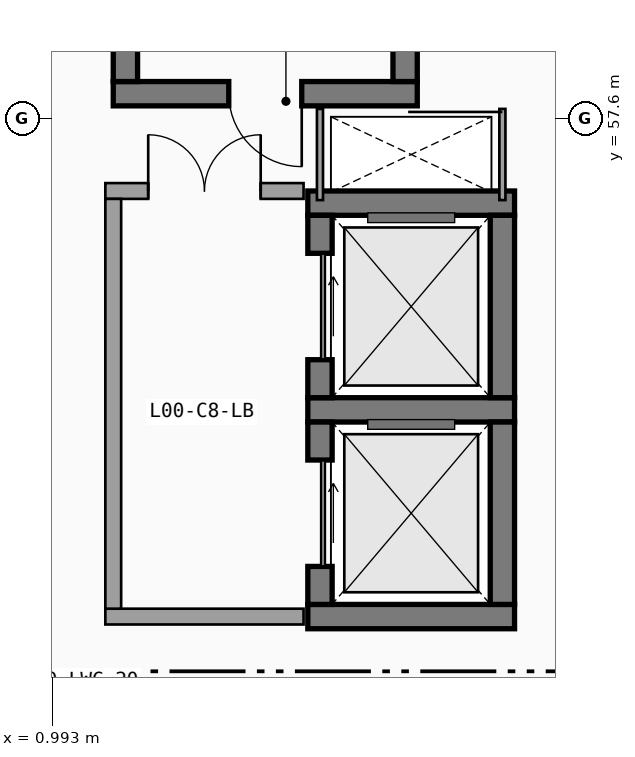
"""IFC4 building model, lengths in metres.
Left out: names, types, materials, properties, quantities, classifications, styles, units other than length and angle.
Written with IfcOpenShell. Run it as: python <this file> out.ifc"""

import sys

from ifc_helpers import new_model, si_unit, direction, frame, frame_2d, origin, place, context, subcontext, project, spatial, rectangle, extrude, element, fill, save


model = new_model("IFC4")
c1 = context("Model", 3, precision=1e-05, world=origin(), true_north=direction((0.0, 1.0)))
c2 = subcontext(c1, "Body", "Model", "MODEL_VIEW")
j1 = project(units=[si_unit("LENGTHUNIT", "METRE"), si_unit("PLANEANGLEUNIT", "RADIAN")], contexts=[c1])
p1 = place(None, origin())
s1 = spatial("IfcSite", under=j1, at=p1, CompositionType="ELEMENT")
p2 = place(p1, origin())
s2 = spatial("IfcBuilding", under=s1, at=p2, CompositionType="ELEMENT")
p3 = place(p2, origin())
s3 = spatial("IfcBuildingStorey", under=s2, at=p3, CompositionType="ELEMENT", Elevation=0.0)
p4 = place(p3, frame((2.0, 58.0, 0.0), z_axis=(0.0, 0.0, 1.0), x_axis=(1.0, 0.0, 0.0)))
e1 = element("IfcWall", 1, at=p4, inside=s3, PredefinedType="SHEAR", context=c2, shape_type="SweptSolid", body=[
    extrude(rectangle(XDim=5.0, YDim=0.4, at=frame_2d((2.5, 0.0))), origin(), (0.0, 0.0, 1.0), 4.5),
])
p5 = place(p4, frame((3.1, 0.0, 0.0), z_axis=(0.0, 0.0, 1.0), x_axis=(-1.0, 0.0, 0.0)))
e2 = element("IfcOpeningElement", 2, at=p5, cuts=e1, PredefinedType="OPENING", context=c2, shape_type="SweptSolid", body=[
    extrude(rectangle(XDim=1.2, YDim=2.2, at=frame_2d((0.6, 1.1))), frame((0.0, 0.21, 0.0), z_axis=(0.0, -1.0, 0.0), x_axis=(1.0, 0.0, 0.0)), (0.0, 0.0, 1.0), 0.42),
])
for number, where, z_axis, x_axis in (
    (3, (2.2, 66.35, 0.0), (0.0, 0.0, 1.0), (0.0, -1.0, 0.0)),
    (4, (6.8, 58.2, 0.0), (0.0, 0.0, 1.0), (0.0, 1.0, 0.0)),
):
    element("IfcWall", number, at=place(p3, frame(where, z_axis=z_axis, x_axis=x_axis)), inside=s3, PredefinedType="SHEAR", context=c2, shape_type="SweptSolid", body=[
        extrude(rectangle(XDim=8.15, YDim=0.4, at=frame_2d((4.075, 0.0))), origin(), (0.0, 0.0, 1.0), 4.5),
    ])
for number, where, z_axis, x_axis in (
    (5, (5.2, 49.4, 0.0), (0.0, 0.0, 1.0), (1.0, 0.0, 0.0)),
    (6, (8.6, 52.8, 0.0), (0.0, 0.0, 1.0), (-1.0, 0.0, 0.0)),
):
    element("IfcWall", number, at=place(p3, frame(where, z_axis=z_axis, x_axis=x_axis)), inside=s3, PredefinedType="SHEAR", context=c2, shape_type="SweptSolid", body=[
        extrude(rectangle(XDim=3.4, YDim=0.4, at=frame_2d((1.7, 0.0))), origin(), (0.0, 0.0, 1.0), 4.5),
    ])
p6 = place(p3, frame((5.4, 52.6, 0.0), z_axis=(0.0, 0.0, 1.0), x_axis=(0.0, -1.0, 0.0)))
e7 = element("IfcWall", 7, at=p6, inside=s3, PredefinedType="SHEAR", context=c2, shape_type="SweptSolid", body=[
    extrude(rectangle(XDim=3.0, YDim=0.4, at=frame_2d((1.5, 0.0))), origin(), (0.0, 0.0, 1.0), 4.5),
])
p7 = place(p6, frame((0.625, 0.0, 0.0), z_axis=(0.0, 0.0, 1.0), x_axis=(1.0, 0.0, 0.0)))
e8 = element("IfcOpeningElement", 8, at=p7, cuts=e7, PredefinedType="OPENING", context=c2, shape_type="SweptSolid", body=[
    extrude(rectangle(XDim=1.75, YDim=2.35, at=frame_2d((0.875, 1.175))), frame((0.0, 0.21, 0.0), z_axis=(0.0, -1.0, 0.0), x_axis=(1.0, 0.0, 0.0)), (0.0, 0.0, 1.0), 0.42),
])
p8 = place(p3, frame((8.4, 49.6, 0.0), z_axis=(0.0, 0.0, 1.0), x_axis=(0.0, 1.0, 0.0)))
e9 = element("IfcWall", 9, at=p8, inside=s3, PredefinedType="SHEAR", context=c2, shape_type="SweptSolid", body=[
    extrude(rectangle(XDim=3.0, YDim=0.4, at=frame_2d((1.5, 0.0))), origin(), (0.0, 0.0, 1.0), 4.5),
])
p9 = place(p3, frame((8.6, 56.2, 0.0), z_axis=(0.0, 0.0, 1.0), x_axis=(-1.0, 0.0, 0.0)))
e10 = element("IfcWall", 10, at=p9, inside=s3, PredefinedType="SHEAR", context=c2, shape_type="SweptSolid", body=[
    extrude(rectangle(XDim=3.4, YDim=0.4, at=frame_2d((1.7, 0.0))), origin(), (0.0, 0.0, 1.0), 4.5),
])
p10 = place(p3, frame((5.4, 56.0, 0.0), z_axis=(0.0, 0.0, 1.0), x_axis=(0.0, -1.0, 0.0)))
e11 = element("IfcWall", 11, at=p10, inside=s3, PredefinedType="SHEAR", context=c2, shape_type="SweptSolid", body=[
    extrude(rectangle(XDim=3.0, YDim=0.4, at=frame_2d((1.5, 0.0))), origin(), (0.0, 0.0, 1.0), 4.5),
])
p11 = place(p10, frame((0.625, 0.0, 0.0), z_axis=(0.0, 0.0, 1.0), x_axis=(1.0, 0.0, 0.0)))
e12 = element("IfcOpeningElement", 12, at=p11, cuts=e11, PredefinedType="OPENING", context=c2, shape_type="SweptSolid", body=[
    extrude(rectangle(XDim=1.75, YDim=2.35, at=frame_2d((0.875, 1.175))), frame((0.0, 0.21, 0.0), z_axis=(0.0, -1.0, 0.0), x_axis=(1.0, 0.0, 0.0)), (0.0, 0.0, 1.0), 0.42),
])
p12 = place(p3, frame((8.4, 53.0, 0.0), z_axis=(0.0, 0.0, 1.0), x_axis=(0.0, 1.0, 0.0)))
e13 = element("IfcWall", 13, at=p12, inside=s3, PredefinedType="SHEAR", context=c2, shape_type="SweptSolid", body=[
    extrude(rectangle(XDim=3.0, YDim=0.4, at=frame_2d((1.5, 0.0))), origin(), (0.0, 0.0, 1.0), 4.5),
])
for number, where, z_axis, x_axis in (
    (14, (5.4, 57.75, 0.0), (0.0, 0.0, 1.0), (0.0, -1.0, 0.0)),
    (15, (8.4, 56.25, 0.0), (0.0, 0.0, 1.0), (0.0, 1.0, 0.0)),
):
    element("IfcWall", number, at=place(p3, frame(where, z_axis=z_axis, x_axis=x_axis)), inside=s3, PredefinedType="PARTITIONING", context=c2, shape_type="SweptSolid", body=[
        extrude(rectangle(XDim=1.5, YDim=0.1, at=frame_2d((0.75, 0.0))), origin(), (0.0, 0.0, 1.0), 4.5),
    ])
p13 = place(p3, frame((1.87, 49.4, 0.0), z_axis=(0.0, 0.0, 1.0), x_axis=(1.0, 0.0, 0.0)))
e16 = element("IfcWall", 16, at=p13, inside=s3, PredefinedType="SOLIDWALL", context=c2, shape_type="SweptSolid", body=[
    extrude(rectangle(XDim=3.26, YDim=0.26, at=frame_2d((1.63, 0.0))), origin(), (0.0, 0.0, 1.0), 4.5),
])
p14 = place(p3, frame((5.13, 56.4, 0.0), z_axis=(0.0, 0.0, 1.0), x_axis=(-1.0, 0.0, 0.0)))
e17 = element("IfcWall", 17, at=p14, inside=s3, PredefinedType="SOLIDWALL", context=c2, shape_type="SweptSolid", body=[
    extrude(rectangle(XDim=3.26, YDim=0.26, at=frame_2d((1.63, 0.0))), origin(), (0.0, 0.0, 1.0), 4.5),
])
p15 = place(p14, frame((2.555, 0.0, 0.0), z_axis=(0.0, 0.0, 1.0), x_axis=(-1.0, 0.0, 0.0)))
e18 = element("IfcOpeningElement", 18, at=p15, cuts=e17, PredefinedType="OPENING", context=c2, shape_type="SweptSolid", body=[
    extrude(rectangle(XDim=1.85, YDim=2.25, at=frame_2d((0.925, 1.125))), frame((0.0, 0.14, 0.0), z_axis=(0.0, -1.0, 0.0), x_axis=(1.0, 0.0, 0.0)), (0.0, 0.0, 1.0), 0.28),
])
p16 = place(p3, frame((2.0, 56.27, 0.0), z_axis=(0.0, 0.0, 1.0), x_axis=(0.0, -1.0, 0.0)))
e19 = element("IfcWall", 19, at=p16, inside=s3, PredefinedType="SOLIDWALL", context=c2, shape_type="SweptSolid", body=[
    extrude(rectangle(XDim=6.74, YDim=0.26, at=frame_2d((3.37, 0.0))), origin(), (0.0, 0.0, 1.0), 4.5),
])
p17 = place(p5, origin())
e20 = element("IfcDoor", 20, at=p17, inside=s3, OperationType="SINGLE_SWING_LEFT", PredefinedType="DOOR", context=c2, shape_type="SweptSolid", body=[
    extrude(rectangle(XDim=1.2, YDim=2.2, at=frame_2d((0.6, 1.1))), frame((0.0, 0.025, 0.0), z_axis=(0.0, -1.0, 0.0), x_axis=(1.0, 0.0, 0.0)), (0.0, 0.0, 1.0), 0.05),
])
fill(e2, e20)
p18 = place(p7, origin())
e21 = element("IfcDoor", 21, at=p18, inside=s3, OperationType="SLIDING_TO_LEFT", PredefinedType="DOOR", context=c2, shape_type="SweptSolid", body=[
    extrude(rectangle(XDim=1.75, YDim=2.35, at=frame_2d((0.875, 1.175))), frame((0.0, 0.025, 0.0), z_axis=(0.0, -1.0, 0.0), x_axis=(1.0, 0.0, 0.0)), (0.0, 0.0, 1.0), 0.05),
])
fill(e8, e21)
p19 = place(p11, origin())
e22 = element("IfcDoor", 22, at=p19, inside=s3, OperationType="SLIDING_TO_LEFT", PredefinedType="DOOR", context=c2, shape_type="SweptSolid", body=[
    extrude(rectangle(XDim=1.75, YDim=2.35, at=frame_2d((0.875, 1.175))), frame((0.0, 0.025, 0.0), z_axis=(0.0, -1.0, 0.0), x_axis=(1.0, 0.0, 0.0)), (0.0, 0.0, 1.0), 0.05),
])
fill(e12, e22)
p20 = place(p15, origin())
e23 = element("IfcDoor", 23, at=p20, inside=s3, OperationType="DOUBLE_DOOR_SINGLE_SWING", PredefinedType="DOOR", context=c2, shape_type="SweptSolid", body=[
    extrude(rectangle(XDim=1.85, YDim=2.25, at=frame_2d((0.925, 1.125))), frame((0.0, 0.025, 0.0), z_axis=(0.0, -1.0, 0.0), x_axis=(1.0, 0.0, 0.0)), (0.0, 0.0, 1.0), 0.05),
])
fill(e18, e23)
save(model, sys.argv[1])
